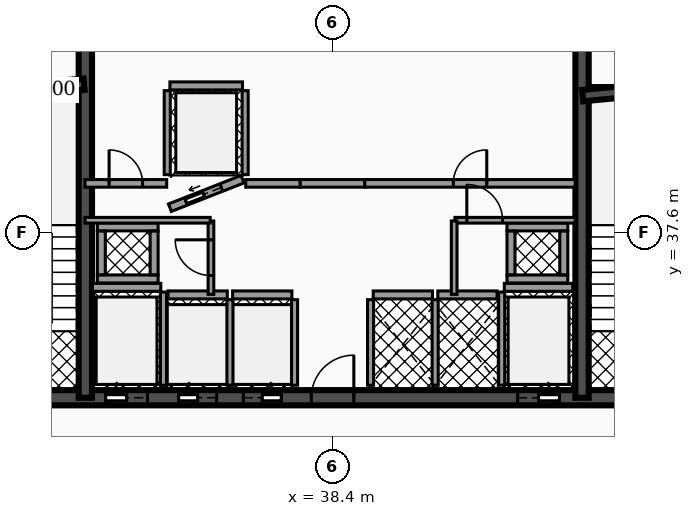
"""IFC4 building model, lengths in metres.
Left out: names, types, materials, properties, quantities, classifications, styles, units other than length and angle.
Written with IfcOpenShell. Run it as: python <this file> out.ifc"""

import sys

from ifc_helpers import new_model, si_unit, direction, frame, frame_2d, origin, place, context, subcontext, project, spatial, rectangle, extrude, element, fill, save


model = new_model("IFC4")
c1 = context("Model", 3, precision=1e-05, world=origin(), true_north=direction((0.0, 1.0)))
c2 = subcontext(c1, "Body", "Model", "MODEL_VIEW")
j1 = project(units=[si_unit("LENGTHUNIT", "METRE"), si_unit("PLANEANGLEUNIT", "RADIAN")], contexts=[c1])
p1 = place(None, origin())
s1 = spatial("IfcSite", under=j1, at=p1, CompositionType="ELEMENT")
p2 = place(p1, origin())
s2 = spatial("IfcBuilding", under=s1, at=p2, CompositionType="ELEMENT")
p3 = place(p2, frame((0.0, 0.0, 164.56)))
s3 = spatial("IfcBuildingStorey", under=s2, at=p3, CompositionType="ELEMENT", Elevation=164.56)
p4 = place(p3, frame((28.4, 33.25, 0.0), z_axis=(0.0, 0.0, 1.0), x_axis=(1.0, 0.0, 0.0)))
e1 = element("IfcWall", 1, at=p4, inside=s3, PredefinedType="SHEAR", context=c2, shape_type="SweptSolid", body=[
    extrude(rectangle(XDim=20.06, YDim=0.4, at=frame_2d((10.03, 0.0))), origin(), (0.0, 0.0, 1.0), 3.5),
])
p5 = place(p4, frame((4.03, 0.0, 0.0)))
e2 = element("IfcOpeningElement", 2, at=p5, cuts=e1, PredefinedType="OPENING", context=c2, shape_type="SweptSolid", body=[
    extrude(rectangle(XDim=1.1, YDim=2.15, at=frame_2d((0.55, 1.075))), frame((0.0, 0.21, 0.0), z_axis=(0.0, -1.0, 0.0), x_axis=(1.0, 0.0, 0.0)), (0.0, 0.0, 1.0), 0.42),
])
p6 = place(p4, frame((14.87, 0.0, 0.0)))
e3 = element("IfcOpeningElement", 3, at=p6, cuts=e1, PredefinedType="OPENING", context=c2, shape_type="SweptSolid", body=[
    extrude(rectangle(XDim=1.1, YDim=2.15, at=frame_2d((0.55, 1.075))), frame((0.0, 0.21, 0.0), z_axis=(0.0, -1.0, 0.0), x_axis=(1.0, 0.0, 0.0)), (0.0, 0.0, 1.0), 0.42),
])
p7 = place(p4, frame((5.95, 0.0, 0.0)))
e4 = element("IfcOpeningElement", 4, at=p7, cuts=e1, PredefinedType="OPENING", context=c2, shape_type="SweptSolid", body=[
    extrude(rectangle(XDim=1.0, YDim=2.1, at=frame_2d((0.5, 1.05))), frame((0.0, 0.21, 0.0), z_axis=(0.0, -1.0, 0.0), x_axis=(1.0, 0.0, 0.0)), (0.0, 0.0, 1.0), 0.42),
])
p8 = place(p4, frame((7.65, 0.0, 0.0)))
e5 = element("IfcOpeningElement", 5, at=p8, cuts=e1, PredefinedType="OPENING", context=c2, shape_type="SweptSolid", body=[
    extrude(rectangle(XDim=1.0, YDim=2.1, at=frame_2d((0.5, 1.05))), frame((0.0, 0.21, 0.0), z_axis=(0.0, -1.0, 0.0), x_axis=(1.0, 0.0, 0.0)), (0.0, 0.0, 1.0), 0.42),
])
p9 = place(p4, frame((1.31, 0.0, 0.0)))
e6 = element("IfcOpeningElement", 6, at=p9, cuts=e1, PredefinedType="OPENING", context=c2, shape_type="SweptSolid", body=[
    extrude(rectangle(XDim=1.1, YDim=2.2, at=frame_2d((0.55, 1.1))), frame((0.0, 0.21, 0.0), z_axis=(0.0, -1.0, 0.0), x_axis=(1.0, 0.0, 0.0)), (0.0, 0.0, 1.0), 0.42),
])
p10 = place(p4, frame((9.44, 0.0, 0.0)))
e7 = element("IfcOpeningElement", 7, at=p10, cuts=e1, PredefinedType="OPENING", context=c2, shape_type="SweptSolid", body=[
    extrude(rectangle(XDim=1.12, YDim=2.05, at=frame_2d((0.56, 1.025))), frame((0.0, 0.21, 0.0), z_axis=(0.0, -1.0, 0.0), x_axis=(1.0, 0.0, 0.0)), (0.0, 0.0, 1.0), 0.42),
])
p11 = place(p4, frame((17.65, 0.0, 0.0)))
e8 = element("IfcOpeningElement", 8, at=p11, cuts=e1, PredefinedType="OPENING", context=c2, shape_type="SweptSolid", body=[
    extrude(rectangle(XDim=1.1, YDim=2.2, at=frame_2d((0.55, 1.1))), frame((0.0, 0.21, 0.0), z_axis=(0.0, -1.0, 0.0), x_axis=(1.0, 0.0, 0.0)), (0.0, 0.0, 1.0), 0.42),
])
for number, where, z_axis, x_axis in (
    (9, (31.895, 33.25, 0.0), (0.0, 0.0, 1.0), (0.0, 1.0, 0.0)),
    (10, (44.965, 33.25, 0.0), (0.0, 0.0, 1.0), (0.0, 1.0, 0.0)),
):
    element("IfcWall", number, at=place(p3, frame(where, z_axis=z_axis, x_axis=x_axis)), inside=s3, PredefinedType="SHEAR", context=c2, shape_type="SweptSolid", body=[
        extrude(rectangle(XDim=10.2, YDim=0.35, at=frame_2d((5.1, 0.0))), origin(), (0.0, 0.0, 1.0), 3.5),
    ])
p12 = place(p3, frame((28.64, 41.2, 0.0), z_axis=(0.0, 0.0, 1.0), x_axis=(0.995687118776, 0.092774789157, 0.0)))
e11 = element("IfcWall", 11, at=p12, inside=s3, PredefinedType="SHEAR", context=c2, shape_type="SweptSolid", body=[
    extrude(rectangle(XDim=3.234, YDim=0.3, at=frame_2d((1.617, 0.0))), origin(), (0.0, 0.0, 1.0), 3.5),
])
p13 = place(p3, frame((44.98, 41.2, 0.0), z_axis=(0.0, 0.0, 1.0), x_axis=(0.995686468965, 0.09278176286, 0.0)))
e12 = element("IfcWall", 12, at=p13, inside=s3, PredefinedType="SHEAR", context=c2, shape_type="SweptSolid", body=[
    extrude(rectangle(XDim=3.234, YDim=0.3, at=frame_2d((1.617, 0.0))), origin(), (0.0, 0.0, 1.0), 3.5),
])
p14 = place(p3, frame((32.08, 36.155, 0.0), z_axis=(0.0, 0.0, 1.0), x_axis=(1.0, 0.0, 0.0)))
e13 = element("IfcWall", 13, at=p14, inside=s3, PredefinedType="SOLIDWALL", context=c2, shape_type="SweptSolid", body=[
    extrude(rectangle(XDim=1.8, YDim=0.21, at=frame_2d((0.9, 0.0))), origin(), (0.0, 0.0, 1.0), 2.472),
])
p15 = place(p3, frame((33.95, 33.58, 0.0), z_axis=(0.0, 0.0, 1.0), x_axis=(0.0, 1.0, 0.0)))
e14 = element("IfcWall", 14, at=p15, inside=s3, PredefinedType="SOLIDWALL", context=c2, shape_type="SweptSolid", body=[
    extrude(rectangle(XDim=2.45, YDim=0.16, at=frame_2d((1.225, 0.0))), origin(), (0.0, 0.0, 1.0), 2.472),
])
p16 = place(p3, frame((42.92, 36.155, 0.0), z_axis=(0.0, 0.0, 1.0), x_axis=(1.0, 0.0, 0.0)))
e15 = element("IfcWall", 15, at=p16, inside=s3, PredefinedType="SOLIDWALL", context=c2, shape_type="SweptSolid", body=[
    extrude(rectangle(XDim=1.8, YDim=0.21, at=frame_2d((0.9, 0.0))), origin(), (0.0, 0.0, 1.0), 2.472),
])
p17 = place(p3, frame((42.85, 33.58, 0.0), z_axis=(0.0, 0.0, 1.0), x_axis=(0.0, 1.0, 0.0)))
e16 = element("IfcWall", 16, at=p17, inside=s3, PredefinedType="SOLIDWALL", context=c2, shape_type="SweptSolid", body=[
    extrude(rectangle(XDim=2.45, YDim=0.16, at=frame_2d((1.225, 0.0))), origin(), (0.0, 0.0, 1.0), 2.472),
])
p18 = place(p3, frame((34.07, 35.955, 0.0), z_axis=(0.0, 0.0, 1.0), x_axis=(1.0, 0.0, 0.0)))
e17 = element("IfcWall", 17, at=p18, inside=s3, PredefinedType="SOLIDWALL", context=c2, shape_type="SweptSolid", body=[
    extrude(rectangle(XDim=1.56, YDim=0.21, at=frame_2d((0.78, 0.0))), origin(), (0.0, 0.0, 1.0), 2.472),
])
p19 = place(p3, frame((35.7, 33.58, 0.0), z_axis=(0.0, 0.0, 1.0), x_axis=(0.0, 1.0, 0.0)))
e18 = element("IfcWall", 18, at=p19, inside=s3, PredefinedType="SOLIDWALL", context=c2, shape_type="SweptSolid", body=[
    extrude(rectangle(XDim=2.25, YDim=0.16, at=frame_2d((1.125, 0.0))), origin(), (0.0, 0.0, 1.0), 2.472),
])
p20 = place(p3, frame((35.77, 35.955, 0.0), z_axis=(0.0, 0.0, 1.0), x_axis=(1.0, 0.0, 0.0)))
e19 = element("IfcWall", 19, at=p20, inside=s3, PredefinedType="SOLIDWALL", context=c2, shape_type="SweptSolid", body=[
    extrude(rectangle(XDim=1.56, YDim=0.21, at=frame_2d((0.78, 0.0))), origin(), (0.0, 0.0, 1.0), 2.472),
])
p21 = place(p3, frame((37.4, 33.58, 0.0), z_axis=(0.0, 0.0, 1.0), x_axis=(0.0, 1.0, 0.0)))
e20 = element("IfcWall", 20, at=p21, inside=s3, PredefinedType="SOLIDWALL", context=c2, shape_type="SweptSolid", body=[
    extrude(rectangle(XDim=2.25, YDim=0.16, at=frame_2d((1.125, 0.0))), origin(), (0.0, 0.0, 1.0), 2.472),
])
p22 = place(p3, frame((34.12, 38.25, 0.0), z_axis=(0.0, 0.0, 1.0), x_axis=(0.930804993012, 0.36551616241, 0.0)))
e21 = element("IfcWall", 21, at=p22, inside=s3, PredefinedType="SOLIDWALL", context=c2, shape_type="SweptSolid", body=[
    extrude(rectangle(XDim=2.052, YDim=0.21, at=frame_2d((1.026, 0.0))), origin(), (0.0, 0.0, 1.0), 2.472),
])
p23 = place(p22, frame((0.455, 0.0, 0.0)))
e22 = element("IfcOpeningElement", 22, at=p23, cuts=e21, PredefinedType="OPENING", context=c2, shape_type="SweptSolid", body=[
    extrude(rectangle(XDim=1.0, YDim=2.1, at=frame_2d((0.5, 1.05))), frame((0.0, 0.115, 0.0), z_axis=(0.0, -1.0, 0.0), x_axis=(1.0, 0.0, 0.0)), (0.0, 0.0, 1.0), 0.23),
])
p24 = place(p3, frame((34.12, 41.455, 0.0), z_axis=(0.0, 0.0, 1.0), x_axis=(1.0, 0.0, 0.0)))
e23 = element("IfcWall", 23, at=p24, inside=s3, PredefinedType="SOLIDWALL", context=c2, shape_type="SweptSolid", body=[
    extrude(rectangle(XDim=1.91, YDim=0.21, at=frame_2d((0.955, 0.0))), origin(), (0.0, 0.0, 1.0), 2.472),
])
for number, where, z_axis, x_axis in (
    (24, (34.05, 39.12, 0.0), (0.0, 0.0, 1.0), (0.0, 1.0, 0.0)),
    (25, (36.1, 39.12, 0.0), (0.0, 0.0, 1.0), (0.0, 1.0, 0.0)),
):
    element("IfcWall", number, at=place(p3, frame(where, z_axis=z_axis, x_axis=x_axis)), inside=s3, PredefinedType="SOLIDWALL", context=c2, shape_type="SweptSolid", body=[
        extrude(rectangle(XDim=2.21, YDim=0.16, at=frame_2d((1.105, 0.0))), origin(), (0.0, 0.0, 1.0), 2.472),
    ])
p25 = place(p3, frame((39.47, 35.955, 0.0), z_axis=(0.0, 0.0, 1.0), x_axis=(1.0, 0.0, 0.0)))
e26 = element("IfcWall", 26, at=p25, inside=s3, PredefinedType="SOLIDWALL", context=c2, shape_type="SweptSolid", body=[
    extrude(rectangle(XDim=1.56, YDim=0.21, at=frame_2d((0.78, 0.0))), origin(), (0.0, 0.0, 1.0), 2.472),
])
for number, where, z_axis, x_axis in (
    (27, (39.4, 33.58, 0.0), (0.0, 0.0, 1.0), (0.0, 1.0, 0.0)),
    (28, (41.1, 33.58, 0.0), (0.0, 0.0, 1.0), (0.0, 1.0, 0.0)),
):
    element("IfcWall", number, at=place(p3, frame(where, z_axis=z_axis, x_axis=x_axis)), inside=s3, PredefinedType="SOLIDWALL", context=c2, shape_type="SweptSolid", body=[
        extrude(rectangle(XDim=2.25, YDim=0.16, at=frame_2d((1.125, 0.0))), origin(), (0.0, 0.0, 1.0), 2.472),
    ])
p26 = place(p3, frame((41.17, 35.955, 0.0), z_axis=(0.0, 0.0, 1.0), x_axis=(1.0, 0.0, 0.0)))
e29 = element("IfcWall", 29, at=p26, inside=s3, PredefinedType="SOLIDWALL", context=c2, shape_type="SweptSolid", body=[
    extrude(rectangle(XDim=1.56, YDim=0.21, at=frame_2d((0.78, 0.0))), origin(), (0.0, 0.0, 1.0), 2.472),
])
for number, where, z_axis, x_axis in (
    (30, (32.21, 36.375, 0.0), (0.0, 0.0, 1.0), (1.0, 0.0, 0.0)),
    (31, (32.21, 37.745, 0.0), (0.0, 0.0, 1.0), (1.0, 0.0, 0.0)),
):
    element("IfcWall", number, at=place(p3, frame(where, z_axis=z_axis, x_axis=x_axis)), inside=s3, PredefinedType="SOLIDWALL", context=c2, shape_type="SweptSolid", body=[
        extrude(rectangle(XDim=1.6, YDim=0.21, at=frame_2d((0.8, 0.0))), origin(), (0.0, 0.0, 1.0), 3.5),
    ])
for number, where, z_axis, x_axis in (
    (32, (32.315, 36.485, 0.0), (0.0, 0.0, 1.0), (0.0, 1.0, 0.0)),
    (33, (33.705, 36.485, 0.0), (0.0, 0.0, 1.0), (0.0, 1.0, 0.0)),
):
    element("IfcWall", number, at=place(p3, frame(where, z_axis=z_axis, x_axis=x_axis)), inside=s3, PredefinedType="SOLIDWALL", context=c2, shape_type="SweptSolid", body=[
        extrude(rectangle(XDim=1.15, YDim=0.21, at=frame_2d((0.575, 0.0))), origin(), (0.0, 0.0, 1.0), 3.5),
    ])
for number, where, z_axis, x_axis in (
    (34, (42.99, 36.375, 0.0), (0.0, 0.0, 1.0), (1.0, 0.0, 0.0)),
    (35, (42.99, 37.745, 0.0), (0.0, 0.0, 1.0), (1.0, 0.0, 0.0)),
):
    element("IfcWall", number, at=place(p3, frame(where, z_axis=z_axis, x_axis=x_axis)), inside=s3, PredefinedType="SOLIDWALL", context=c2, shape_type="SweptSolid", body=[
        extrude(rectangle(XDim=1.6, YDim=0.21, at=frame_2d((0.8, 0.0))), origin(), (0.0, 0.0, 1.0), 3.5),
    ])
for number, where, z_axis, x_axis in (
    (36, (43.095, 36.485, 0.0), (0.0, 0.0, 1.0), (0.0, 1.0, 0.0)),
    (37, (44.485, 36.485, 0.0), (0.0, 0.0, 1.0), (0.0, 1.0, 0.0)),
):
    element("IfcWall", number, at=place(p3, frame(where, z_axis=z_axis, x_axis=x_axis)), inside=s3, PredefinedType="SOLIDWALL", context=c2, shape_type="SweptSolid", body=[
        extrude(rectangle(XDim=1.15, YDim=0.21, at=frame_2d((0.575, 0.0))), origin(), (0.0, 0.0, 1.0), 3.5),
    ])
p27 = place(p3, frame((35.2, 35.97, 0.0), z_axis=(0.0, 0.0, 1.0), x_axis=(0.0, 1.0, 0.0)))
e38 = element("IfcWall", 38, at=p27, inside=s3, PredefinedType="PARTITIONING", context=c2, shape_type="SweptSolid", body=[
    extrude(rectangle(XDim=1.93, YDim=0.15, at=frame_2d((0.965, 0.0))), origin(), (0.0, 0.0, 1.0), 2.457),
])
p28 = place(p27, frame((0.495, 0.0, 0.0)))
e39 = element("IfcOpeningElement", 39, at=p28, cuts=e38, PredefinedType="OPENING", context=c2, shape_type="SweptSolid", body=[
    extrude(rectangle(XDim=0.94, YDim=2.05, at=frame_2d((0.47, 1.025))), frame((0.0, 0.085, 0.0), z_axis=(0.0, -1.0, 0.0), x_axis=(1.0, 0.0, 0.0)), (0.0, 0.0, 1.0), 0.17),
])
p29 = place(p3, frame((31.885, 37.92, 0.0), z_axis=(0.0, 0.0, 1.0), x_axis=(1.0, 0.0, 0.0)))
e40 = element("IfcWall", 40, at=p29, inside=s3, PredefinedType="PARTITIONING", context=c2, shape_type="SweptSolid", body=[
    extrude(rectangle(XDim=3.295, YDim=0.15, at=frame_2d((1.647, 0.0))), origin(), (0.0, 0.0, 1.0), 2.457),
])
p30 = place(p3, frame((31.885, 38.89, 0.0), z_axis=(0.0, 0.0, 1.0), x_axis=(1.0, 0.0, 0.0)))
e41 = element("IfcWall", 41, at=p30, inside=s3, PredefinedType="PARTITIONING", context=c2, shape_type="SweptSolid", body=[
    extrude(rectangle(XDim=2.15, YDim=0.2, at=frame_2d((1.075, 0.0))), origin(), (0.0, 0.0, 1.0), 2.457),
])
p31 = place(p30, frame((0.635, 0.0, 0.0)))
e42 = element("IfcOpeningElement", 42, at=p31, cuts=e41, PredefinedType="OPENING", context=c2, shape_type="SweptSolid", body=[
    extrude(rectangle(XDim=0.88, YDim=2.05, at=frame_2d((0.44, 1.025))), frame((0.0, 0.11, 0.0), z_axis=(0.0, -1.0, 0.0), x_axis=(1.0, 0.0, 0.0)), (0.0, 0.0, 1.0), 0.22),
])
p32 = place(p3, frame((36.115, 38.89, 0.0), z_axis=(0.0, 0.0, 1.0), x_axis=(1.0, 0.0, 0.0)))
e43 = element("IfcWall", 43, at=p32, inside=s3, PredefinedType="PARTITIONING", context=c2, shape_type="SweptSolid", body=[
    extrude(rectangle(XDim=1.435, YDim=0.2, at=frame_2d((0.718, 0.0))), origin(), (0.0, 0.0, 1.0), 2.457),
])
p33 = place(p3, frame((37.55, 38.89, 0.0), z_axis=(0.0, 0.0, 1.0), x_axis=(1.0, 0.0, 0.0)))
e44 = element("IfcWall", 44, at=p33, inside=s3, PredefinedType="PARTITIONING", context=c2, shape_type="SweptSolid", body=[
    extrude(rectangle(XDim=1.7, YDim=0.2, at=frame_2d((0.85, 0.0))), origin(), (0.0, 0.0, 1.0), 2.457),
])
p34 = place(p3, frame((39.25, 38.89, 0.0), z_axis=(0.0, 0.0, 1.0), x_axis=(1.0, 0.0, 0.0)))
e45 = element("IfcWall", 45, at=p34, inside=s3, PredefinedType="PARTITIONING", context=c2, shape_type="SweptSolid", body=[
    extrude(rectangle(XDim=5.535, YDim=0.2, at=frame_2d((2.768, 0.0))), origin(), (0.0, 0.0, 1.0), 2.457),
])
p35 = place(p34, frame((2.327, 0.0, 0.0)))
e46 = element("IfcOpeningElement", 46, at=p35, cuts=e45, PredefinedType="OPENING", context=c2, shape_type="SweptSolid", body=[
    extrude(rectangle(XDim=0.88, YDim=2.05, at=frame_2d((0.44, 1.025))), frame((0.0, 0.11, 0.0), z_axis=(0.0, -1.0, 0.0), x_axis=(1.0, 0.0, 0.0)), (0.0, 0.0, 1.0), 0.22),
])
p36 = place(p3, frame((41.62, 37.92, 0.0), z_axis=(0.0, 0.0, 1.0), x_axis=(1.0, 0.0, 0.0)))
e47 = element("IfcWall", 47, at=p36, inside=s3, PredefinedType="PARTITIONING", context=c2, shape_type="SweptSolid", body=[
    extrude(rectangle(XDim=3.165, YDim=0.15, at=frame_2d((1.583, 0.0))), origin(), (0.0, 0.0, 1.0), 2.457),
])
p37 = place(p36, frame((0.312, 0.0, 0.0)))
e48 = element("IfcOpeningElement", 48, at=p37, cuts=e47, PredefinedType="OPENING", context=c2, shape_type="SweptSolid", body=[
    extrude(rectangle(XDim=0.94, YDim=2.05, at=frame_2d((0.47, 1.025))), frame((0.0, 0.085, 0.0), z_axis=(0.0, -1.0, 0.0), x_axis=(1.0, 0.0, 0.0)), (0.0, 0.0, 1.0), 0.17),
])
p38 = place(p3, frame((41.6, 35.97, 0.0), z_axis=(0.0, 0.0, 1.0), x_axis=(0.0, 1.0, 0.0)))
e49 = element("IfcWall", 49, at=p38, inside=s3, PredefinedType="PARTITIONING", context=c2, shape_type="SweptSolid", body=[
    extrude(rectangle(XDim=1.93, YDim=0.15, at=frame_2d((0.965, 0.0))), origin(), (0.0, 0.0, 1.0), 2.457),
])
p39 = place(p5, origin())
e50 = element("IfcDoor", 50, at=p39, inside=s3, OperationType="SLIDING_TO_LEFT", PredefinedType="DOOR", context=c2, shape_type="SweptSolid", body=[
    extrude(rectangle(XDim=1.1, YDim=2.15, at=frame_2d((0.55, 1.075))), frame((0.0, 0.025, 0.0), z_axis=(0.0, -1.0, 0.0), x_axis=(1.0, 0.0, 0.0)), (0.0, 0.0, 1.0), 0.05),
])
fill(e2, e50)
p40 = place(p6, origin())
e51 = element("IfcDoor", 51, at=p40, inside=s3, OperationType="SLIDING_TO_RIGHT", PredefinedType="DOOR", context=c2, shape_type="SweptSolid", body=[
    extrude(rectangle(XDim=1.1, YDim=2.15, at=frame_2d((0.55, 1.075))), frame((0.0, 0.025, 0.0), z_axis=(0.0, -1.0, 0.0), x_axis=(1.0, 0.0, 0.0)), (0.0, 0.0, 1.0), 0.05),
])
fill(e3, e51)
p41 = place(p7, origin())
e52 = element("IfcDoor", 52, at=p41, inside=s3, OperationType="SLIDING_TO_LEFT", PredefinedType="DOOR", context=c2, shape_type="SweptSolid", body=[
    extrude(rectangle(XDim=1.0, YDim=2.1, at=frame_2d((0.5, 1.05))), frame((0.0, 0.025, 0.0), z_axis=(0.0, -1.0, 0.0), x_axis=(1.0, 0.0, 0.0)), (0.0, 0.0, 1.0), 0.05),
])
fill(e4, e52)
p42 = place(p8, origin())
e53 = element("IfcDoor", 53, at=p42, inside=s3, OperationType="SLIDING_TO_RIGHT", PredefinedType="DOOR", context=c2, shape_type="SweptSolid", body=[
    extrude(rectangle(XDim=1.0, YDim=2.1, at=frame_2d((0.5, 1.05))), frame((0.0, 0.025, 0.0), z_axis=(0.0, -1.0, 0.0), x_axis=(1.0, 0.0, 0.0)), (0.0, 0.0, 1.0), 0.05),
])
fill(e5, e53)
p43 = place(p23, origin())
e54 = element("IfcDoor", 54, at=p43, inside=s3, OperationType="SLIDING_TO_LEFT", PredefinedType="DOOR", context=c2, shape_type="SweptSolid", body=[
    extrude(rectangle(XDim=1.0, YDim=2.1, at=frame_2d((0.5, 1.05))), frame((0.0, 0.025, 0.0), z_axis=(0.0, -1.0, 0.0), x_axis=(1.0, 0.0, 0.0)), (0.0, 0.0, 1.0), 0.05),
])
fill(e22, e54)
p44 = place(p10, origin())
e55 = element("IfcDoor", 55, at=p44, inside=s3, OperationType="SINGLE_SWING_RIGHT", PredefinedType="DOOR", context=c2, shape_type="SweptSolid", body=[
    extrude(rectangle(XDim=1.12, YDim=2.05, at=frame_2d((0.56, 1.025))), frame((0.0, 0.025, 0.0), z_axis=(0.0, -1.0, 0.0), x_axis=(1.0, 0.0, 0.0)), (0.0, 0.0, 1.0), 0.05),
])
fill(e7, e55)
p45 = place(p28, origin())
e56 = element("IfcDoor", 56, at=p45, inside=s3, OperationType="SINGLE_SWING_RIGHT", PredefinedType="DOOR", context=c2, shape_type="SweptSolid", body=[
    extrude(rectangle(XDim=0.94, YDim=2.05, at=frame_2d((0.47, 1.025))), frame((0.0, 0.025, 0.0), z_axis=(0.0, -1.0, 0.0), x_axis=(1.0, 0.0, 0.0)), (0.0, 0.0, 1.0), 0.05),
])
fill(e39, e56)
p46 = place(p31, origin())
e57 = element("IfcDoor", 57, at=p46, inside=s3, OperationType="SINGLE_SWING_LEFT", PredefinedType="DOOR", context=c2, shape_type="SweptSolid", body=[
    extrude(rectangle(XDim=0.88, YDim=2.05, at=frame_2d((0.44, 1.025))), frame((0.0, 0.025, 0.0), z_axis=(0.0, -1.0, 0.0), x_axis=(1.0, 0.0, 0.0)), (0.0, 0.0, 1.0), 0.05),
])
fill(e42, e57)
p47 = place(p35, origin())
e58 = element("IfcDoor", 58, at=p47, inside=s3, OperationType="SINGLE_SWING_RIGHT", PredefinedType="DOOR", context=c2, shape_type="SweptSolid", body=[
    extrude(rectangle(XDim=0.88, YDim=2.05, at=frame_2d((0.44, 1.025))), frame((0.0, 0.025, 0.0), z_axis=(0.0, -1.0, 0.0), x_axis=(1.0, 0.0, 0.0)), (0.0, 0.0, 1.0), 0.05),
])
fill(e46, e58)
p48 = place(p37, origin())
e59 = element("IfcDoor", 59, at=p48, inside=s3, OperationType="SINGLE_SWING_LEFT", PredefinedType="DOOR", context=c2, shape_type="SweptSolid", body=[
    extrude(rectangle(XDim=0.94, YDim=2.05, at=frame_2d((0.47, 1.025))), frame((0.0, 0.025, 0.0), z_axis=(0.0, -1.0, 0.0), x_axis=(1.0, 0.0, 0.0)), (0.0, 0.0, 1.0), 0.05),
])
fill(e48, e59)
save(model, sys.argv[1])
